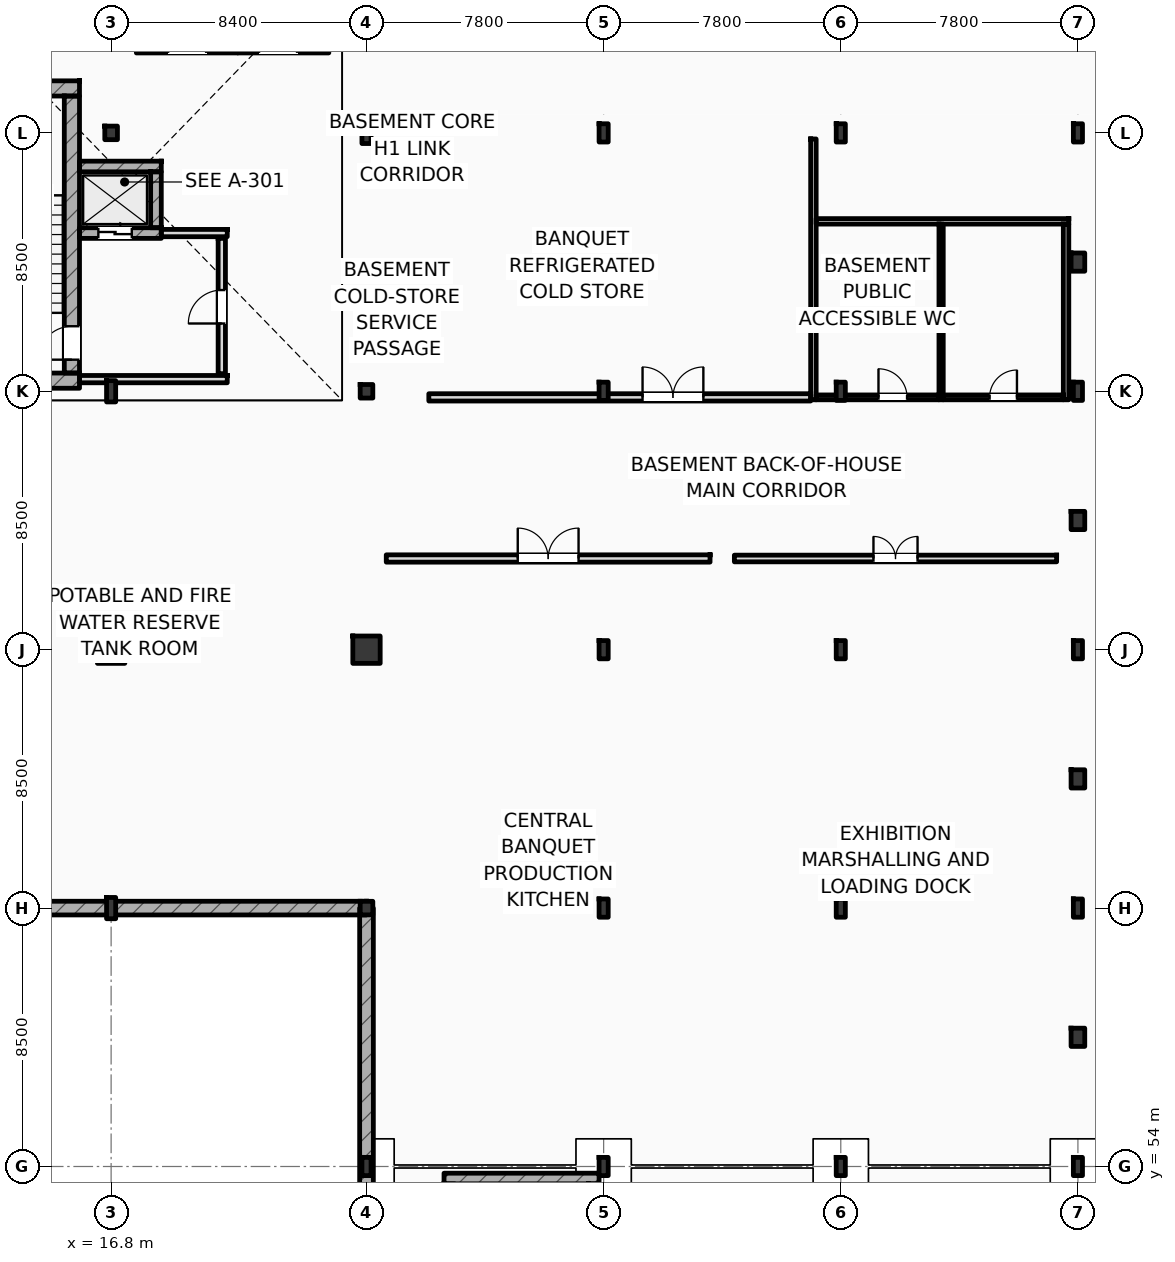
"""IFC4 building model, lengths in metres.
Left out: names, types, materials, properties, quantities, classifications, styles, units other than length and angle.
Written with IfcOpenShell. Run it as: python <this file> out.ifc"""

import sys

from ifc_helpers import new_model, si_unit, direction, frame, frame_2d, origin, origin_2d, place, context, subcontext, project, spatial, rectangle, i_section, extrude, element, fill, save


model = new_model("IFC4")
c1 = context("Model", 3, precision=1e-05, world=origin(), true_north=direction((0.0, 1.0)))
c2 = subcontext(c1, "Body", "Model", "MODEL_VIEW")
j1 = project(units=[si_unit("LENGTHUNIT", "METRE"), si_unit("PLANEANGLEUNIT", "RADIAN")], contexts=[c1])
p1 = place(None, origin())
s1 = spatial("IfcSite", under=j1, at=p1, CompositionType="ELEMENT")
p2 = place(p1, origin())
s2 = spatial("IfcBuilding", under=s1, at=p2, CompositionType="ELEMENT")
p3 = place(p2, frame((0.0, 0.0, -4.5)))
s3 = spatial("IfcBuildingStorey", under=s2, at=p3, CompositionType="ELEMENT", Elevation=-4.5)
p4 = place(p3, frame((0.0, 62.5, 0.0), z_axis=(0.0, 0.0, 1.0), x_axis=(1.0, 0.0, 0.0)))
e1 = element("IfcWall", 1, at=p4, inside=s3, PredefinedType="SOLIDWALL", context=c2, shape_type="SweptSolid", body=[
    extrude(rectangle(XDim=25.2, YDim=0.45, at=frame_2d((12.6, 0.0))), origin(), (0.0, 0.0, 1.0), 4.5),
])
p5 = place(p3, frame((25.2, 62.5, 0.0), z_axis=(0.0, 0.0, 1.0), x_axis=(0.0, -1.0, 0.0)))
e2 = element("IfcWall", 2, at=p5, inside=s3, PredefinedType="SOLIDWALL", context=c2, shape_type="SweptSolid", body=[
    extrude(rectangle(XDim=57.0, YDim=0.45, at=frame_2d((28.5, 0.0))), origin(), (0.0, 0.0, 1.0), 4.5),
])
p6 = place(p3, frame((16.8, 62.5, 0.0), z_axis=(0.0, 0.0, 1.0), x_axis=(1.0, 0.0, 0.0)))
e3 = element("IfcColumn", 3, at=p6, inside=s3, PredefinedType="COLUMN", context=c2, shape_type="SweptSolid", body=[
    extrude(i_section(OverallWidth=0.3, OverallDepth=0.7, WebThickness=0.017, FlangeThickness=0.032, FilletRadius=0.027, at=origin_2d()), origin(), (0.0, 0.0, 1.0), 4.5),
])
p7 = place(p3, frame((16.8, 71.0, 0.0), z_axis=(0.0, 0.0, 1.0), x_axis=(1.0, 0.0, 0.0)))
e4 = element("IfcColumn", 4, at=p7, inside=s3, PredefinedType="COLUMN", context=c2, shape_type="SweptSolid", body=[
    extrude(rectangle(XDim=0.9, YDim=0.9, at=origin_2d()), origin(), (0.0, 0.0, 1.0), 4.5),
])
p8 = place(p3, frame((16.8, 79.5, 0.0), z_axis=(0.0, 0.0, 1.0), x_axis=(1.0, 0.0, 0.0)))
e5 = element("IfcColumn", 5, at=p8, inside=s3, PredefinedType="COLUMN", context=c2, shape_type="SweptSolid", body=[
    extrude(i_section(OverallWidth=0.3, OverallDepth=0.7, WebThickness=0.017, FlangeThickness=0.032, FilletRadius=0.027, at=origin_2d()), origin(), (0.0, 0.0, 1.0), 4.5),
])
for number, where, z_axis, x_axis in (
    (6, (16.8, 88.0, 0.0), (0.0, 0.0, 1.0), (1.0, 0.0, 0.0)),
    (7, (25.2, 62.5, 0.0), (0.0, 0.0, 1.0), (1.0, 0.0, 0.0)),
):
    element("IfcColumn", number, at=place(p3, frame(where, z_axis=z_axis, x_axis=x_axis)), inside=s3, PredefinedType="COLUMN", context=c2, shape_type="SweptSolid", body=[
        extrude(i_section(OverallWidth=0.416, OverallDepth=0.446, WebThickness=0.036, FlangeThickness=0.048, FilletRadius=0.015, at=origin_2d()), origin(), (0.0, 0.0, 1.0), 4.5),
    ])
p9 = place(p3, frame((25.2, 71.0, 0.0), z_axis=(0.0, 0.0, 1.0), x_axis=(1.0, 0.0, 0.0)))
e8 = element("IfcColumn", 8, at=p9, inside=s3, PredefinedType="COLUMN", context=c2, shape_type="SweptSolid", body=[
    extrude(rectangle(XDim=0.9, YDim=0.9, at=origin_2d()), origin(), (0.0, 0.0, 1.0), 4.5),
])
p10 = place(p3, frame((25.2, 79.5, 0.0), z_axis=(0.0, 0.0, 1.0), x_axis=(1.0, 0.0, 0.0)))
e9 = element("IfcColumn", 9, at=p10, inside=s3, PredefinedType="COLUMN", context=c2, shape_type="SweptSolid", body=[
    extrude(i_section(OverallWidth=0.416, OverallDepth=0.446, WebThickness=0.036, FlangeThickness=0.048, FilletRadius=0.015, at=origin_2d()), origin(), (0.0, 0.0, 1.0), 4.5),
])
p11 = place(p3, frame((25.2, 88.0, 0.0), z_axis=(0.0, 0.0, 1.0), x_axis=(1.0, 0.0, 0.0)))
e10 = element("IfcColumn", 10, at=p11, inside=s3, PredefinedType="COLUMN", context=c2, shape_type="SweptSolid", body=[
    extrude(i_section(OverallWidth=0.3, OverallDepth=0.7, WebThickness=0.017, FlangeThickness=0.032, FilletRadius=0.027, at=origin_2d()), origin(), (0.0, 0.0, 1.0), 4.5),
])
for number, where, z_axis, x_axis in (
    (11, (25.2, 54.0, 0.0), (0.0, 0.0, 1.0), (1.0, 0.0, 0.0)),
    (12, (33.0, 54.0, 0.0), (0.0, 0.0, 1.0), (1.0, 0.0, 0.0)),
    (13, (33.0, 62.5, 0.0), (0.0, 0.0, 1.0), (1.0, 0.0, 0.0)),
    (14, (33.0, 71.0, 0.0), (0.0, 0.0, 1.0), (1.0, 0.0, 0.0)),
    (15, (33.0, 79.5, 0.0), (0.0, 0.0, 1.0), (1.0, 0.0, 0.0)),
    (16, (33.0, 88.0, 0.0), (0.0, 0.0, 1.0), (1.0, 0.0, 0.0)),
    (17, (40.8, 54.0, 0.0), (0.0, 0.0, 1.0), (1.0, 0.0, 0.0)),
    (18, (40.8, 62.5, 0.0), (0.0, 0.0, 1.0), (1.0, 0.0, 0.0)),
    (19, (40.8, 71.0, 0.0), (0.0, 0.0, 1.0), (1.0, 0.0, 0.0)),
    (20, (40.8, 79.5, 0.0), (0.0, 0.0, 1.0), (1.0, 0.0, 0.0)),
    (21, (40.8, 88.0, 0.0), (0.0, 0.0, 1.0), (1.0, 0.0, 0.0)),
    (22, (48.6, 54.0, 0.0), (0.0, 0.0, 1.0), (1.0, 0.0, 0.0)),
    (23, (48.6, 62.5, 0.0), (0.0, 0.0, 1.0), (1.0, 0.0, 0.0)),
    (24, (48.6, 71.0, 0.0), (0.0, 0.0, 1.0), (1.0, 0.0, 0.0)),
    (25, (48.6, 79.5, 0.0), (0.0, 0.0, 1.0), (1.0, 0.0, 0.0)),
    (26, (48.6, 88.0, 0.0), (0.0, 0.0, 1.0), (1.0, 0.0, 0.0)),
):
    element("IfcColumn", number, at=place(p3, frame(where, z_axis=z_axis, x_axis=x_axis)), inside=s3, PredefinedType="COLUMN", context=c2, shape_type="SweptSolid", body=[
        extrude(i_section(OverallWidth=0.3, OverallDepth=0.6, WebThickness=0.015, FlangeThickness=0.03, FilletRadius=0.027, at=origin_2d()), origin(), (0.0, 0.0, 1.0), 4.5),
    ])
for number, where, z_axis, x_axis in (
    (27, (48.6, 58.25, 0.0), (0.0, 0.0, 1.0), (1.0, 0.0, 0.0)),
    (28, (48.6, 66.75, 0.0), (0.0, 0.0, 1.0), (1.0, 0.0, 0.0)),
    (29, (48.6, 75.25, 0.0), (0.0, 0.0, 1.0), (1.0, 0.0, 0.0)),
    (30, (48.6, 83.75, 0.0), (0.0, 0.0, 1.0), (1.0, 0.0, 0.0)),
):
    element("IfcColumn", number, at=place(p3, frame(where, z_axis=z_axis, x_axis=x_axis)), inside=s3, PredefinedType="PILASTER", context=c2, shape_type="SweptSolid", body=[
        extrude(rectangle(XDim=0.45, YDim=0.6, at=origin_2d()), origin(), (0.0, 0.0, 1.0), 4.5),
    ])
for number, where, z_axis, x_axis in (
    (31, (10.6, 89.462, 0.0), (0.0, 0.0, 1.0), (1.0, 0.0, 0.0)),
    (32, (10.6, 79.85, 0.0), (0.0, 0.0, 1.0), (1.0, 0.0, 0.0)),
):
    element("IfcWall", number, at=place(p3, frame(where, z_axis=z_axis, x_axis=x_axis)), inside=s3, PredefinedType="SHEAR", context=c2, shape_type="SweptSolid", body=[
        extrude(rectangle(XDim=5.16, YDim=0.5, at=frame_2d((2.58, 0.0))), origin(), (0.0, 0.0, 1.0), 4.5),
    ])
p12 = place(p3, frame((15.51, 80.1, 0.0), z_axis=(0.0, 0.0, 1.0), x_axis=(0.0, 1.0, 0.0)))
e33 = element("IfcWall", 33, at=p12, inside=s3, PredefinedType="SHEAR", context=c2, shape_type="SweptSolid", body=[
    extrude(rectangle(XDim=9.112, YDim=0.5, at=frame_2d((4.556, 0.0))), origin(), (0.0, 0.0, 1.0), 4.5),
])
p13 = place(p12, frame((0.44, 0.0, 0.0)))
e34 = element("IfcOpeningElement", 34, at=p13, cuts=e33, PredefinedType="OPENING", context=c2, shape_type="SweptSolid", body=[
    extrude(rectangle(XDim=1.1, YDim=2.2, at=frame_2d((0.55, 1.1))), frame((0.0, 0.26, 0.0), z_axis=(0.0, -1.0, 0.0), x_axis=(1.0, 0.0, 0.0)), (0.0, 0.0, 1.0), 0.52),
])
p14 = place(p3, frame((27.75, 53.605, 0.0), z_axis=(0.0, 0.0, 1.0), x_axis=(1.0, 0.0, 0.0)))
e35 = element("IfcWall", 35, at=p14, inside=s3, PredefinedType="SHEAR", context=c2, shape_type="SweptSolid", body=[
    extrude(rectangle(XDim=5.1, YDim=0.35, at=frame_2d((2.55, 0.0))), origin(), (0.0, 0.0, 1.0), 4.5),
])
p15 = place(p3, frame((15.76, 86.895, 0.0), z_axis=(0.0, 0.0, 1.0), x_axis=(1.0, 0.0, 0.0)))
e36 = element("IfcWall", 36, at=p15, inside=s3, PredefinedType="SHEAR", context=c2, shape_type="SweptSolid", body=[
    extrude(rectangle(XDim=2.69, YDim=0.35, at=frame_2d((1.345, 0.0))), origin(), (0.0, 0.0, 1.0), 4.1),
])
p16 = place(p3, frame((15.76, 84.705, 0.0), z_axis=(0.0, 0.0, 1.0), x_axis=(1.0, 0.0, 0.0)))
e37 = element("IfcWall", 37, at=p16, inside=s3, PredefinedType="SHEAR", context=c2, shape_type="SweptSolid", body=[
    extrude(rectangle(XDim=2.69, YDim=0.35, at=frame_2d((1.345, 0.0))), origin(), (0.0, 0.0, 1.0), 4.1),
])
p17 = place(p16, frame((0.62, 0.0, 0.0)))
e38 = element("IfcOpeningElement", 38, at=p17, cuts=e37, PredefinedType="OPENING", context=c2, shape_type="SweptSolid", body=[
    extrude(rectangle(XDim=1.1, YDim=2.2, at=frame_2d((0.55, 1.1))), frame((0.0, 0.185, 0.0), z_axis=(0.0, -1.0, 0.0), x_axis=(1.0, 0.0, 0.0)), (0.0, 0.0, 1.0), 0.37),
])
p18 = place(p3, frame((18.275, 84.88, 0.0), z_axis=(0.0, 0.0, 1.0), x_axis=(0.0, 1.0, 0.0)))
e39 = element("IfcWall", 39, at=p18, inside=s3, PredefinedType="SHEAR", context=c2, shape_type="SweptSolid", body=[
    extrude(rectangle(XDim=1.84, YDim=0.35, at=frame_2d((0.92, 0.0))), origin(), (0.0, 0.0, 1.0), 4.1),
])
p19 = place(p3, frame((17.63, 90.805, 0.0), z_axis=(0.0, 0.0, 1.0), x_axis=(1.0, 0.0, 0.0)))
e40 = element("IfcWall", 40, at=p19, inside=s3, PredefinedType="SHEAR", context=c2, shape_type="SweptSolid", body=[
    extrude(rectangle(XDim=3.34, YDim=0.35, at=frame_2d((1.67, 0.0))), origin(), (0.0, 0.0, 1.0), 4.1),
])
p20 = place(p19, frame((1.045, 0.0, 0.0)))
e41 = element("IfcOpeningElement", 41, at=p20, cuts=e40, PredefinedType="OPENING", context=c2, shape_type="SweptSolid", body=[
    extrude(rectangle(XDim=1.25, YDim=2.25, at=frame_2d((0.625, 1.125))), frame((0.0, 0.185, 0.0), z_axis=(0.0, -1.0, 0.0), x_axis=(1.0, 0.0, 0.0)), (0.0, 0.0, 1.0), 0.37),
])
p21 = place(p3, frame((20.97, 90.805, 0.0), z_axis=(0.0, 0.0, 1.0), x_axis=(1.0, 0.0, 0.0)))
e42 = element("IfcWall", 42, at=p21, inside=s3, PredefinedType="SHEAR", context=c2, shape_type="SweptSolid", body=[
    extrude(rectangle(XDim=2.99, YDim=0.35, at=frame_2d((1.495, 0.0))), origin(), (0.0, 0.0, 1.0), 4.1),
])
p22 = place(p21, frame((0.695, 0.0, 0.0)))
e43 = element("IfcOpeningElement", 43, at=p22, cuts=e42, PredefinedType="OPENING", context=c2, shape_type="SweptSolid", body=[
    extrude(rectangle(XDim=1.25, YDim=2.25, at=frame_2d((0.625, 1.125))), frame((0.0, 0.185, 0.0), z_axis=(0.0, -1.0, 0.0), x_axis=(1.0, 0.0, 0.0)), (0.0, 0.0, 1.0), 0.37),
])
p23 = place(p3, frame((15.76, 79.9, 0.0), z_axis=(0.0, 0.0, 1.0), x_axis=(1.0, 0.0, 0.0)))
e44 = element("IfcWall", 44, at=p23, inside=s3, PredefinedType="STANDARD", context=c2, shape_type="SweptSolid", body=[
    extrude(rectangle(XDim=4.86, YDim=0.24, at=frame_2d((2.43, 0.0))), origin(), (0.0, 0.0, 1.0), 4.1),
])
p24 = place(p3, frame((18.45, 84.705, 0.0), z_axis=(0.0, 0.0, 1.0), x_axis=(1.0, 0.0, 0.0)))
e45 = element("IfcWall", 45, at=p24, inside=s3, PredefinedType="STANDARD", context=c2, shape_type="SweptSolid", body=[
    extrude(rectangle(XDim=2.17, YDim=0.24, at=frame_2d((1.085, 0.0))), origin(), (0.0, 0.0, 1.0), 4.1),
])
p25 = place(p3, frame((20.44, 80.08, 0.0), z_axis=(0.0, 0.0, 1.0), x_axis=(0.0, 1.0, 0.0)))
e46 = element("IfcWall", 46, at=p25, inside=s3, PredefinedType="STANDARD", context=c2, shape_type="SweptSolid", body=[
    extrude(rectangle(XDim=4.45, YDim=0.24, at=frame_2d((2.225, 0.0))), origin(), (0.0, 0.0, 1.0), 4.1),
])
p26 = place(p25, frame((1.65, 0.0, 0.0)))
e47 = element("IfcOpeningElement", 47, at=p26, cuts=e46, PredefinedType="OPENING", context=c2, shape_type="SweptSolid", body=[
    extrude(rectangle(XDim=1.1, YDim=2.2, at=frame_2d((0.55, 1.1))), frame((0.0, 0.13, 0.0), z_axis=(0.0, -1.0, 0.0), x_axis=(1.0, 0.0, 0.0)), (0.0, 0.0, 1.0), 0.26),
])
p27 = place(p3, frame((25.85, 74.0, 0.0), z_axis=(0.0, 0.0, 1.0), x_axis=(1.0, 0.0, 0.0)))
e48 = element("IfcWall", 48, at=p27, inside=s3, PredefinedType="STANDARD", context=c2, shape_type="SweptSolid", body=[
    extrude(rectangle(XDim=10.65, YDim=0.24, at=frame_2d((5.325, 0.0))), origin(), (0.0, 0.0, 1.0), 4.1),
])
p28 = place(p27, frame((4.325, 0.0, 0.0)))
e49 = element("IfcOpeningElement", 49, at=p28, cuts=e48, PredefinedType="OPENING", context=c2, shape_type="SweptSolid", body=[
    extrude(rectangle(XDim=2.0, YDim=2.35, at=frame_2d((1.0, 1.175))), frame((0.0, 0.13, 0.0), z_axis=(0.0, -1.0, 0.0), x_axis=(1.0, 0.0, 0.0)), (0.0, 0.0, 1.0), 0.26),
])
p29 = place(p3, frame((37.3, 74.0, 0.0), z_axis=(0.0, 0.0, 1.0), x_axis=(1.0, 0.0, 0.0)))
e50 = element("IfcWall", 50, at=p29, inside=s3, PredefinedType="PARTITIONING", context=c2, shape_type="SweptSolid", body=[
    extrude(rectangle(XDim=10.6, YDim=0.22, at=frame_2d((5.3, 0.0))), origin(), (0.0, 0.0, 1.0), 4.1),
])
p30 = place(p29, frame((4.575, 0.0, 0.0)))
e51 = element("IfcOpeningElement", 51, at=p30, cuts=e50, PredefinedType="OPENING", context=c2, shape_type="SweptSolid", body=[
    extrude(rectangle(XDim=1.45, YDim=2.2, at=frame_2d((0.725, 1.1))), frame((0.0, 0.12, 0.0), z_axis=(0.0, -1.0, 0.0), x_axis=(1.0, 0.0, 0.0)), (0.0, 0.0, 1.0), 0.24),
])
p31 = place(p3, frame((27.25, 79.3, 0.0), z_axis=(0.0, 0.0, 1.0), x_axis=(1.0, 0.0, 0.0)))
e52 = element("IfcWall", 52, at=p31, inside=s3, PredefinedType="STANDARD", context=c2, shape_type="SweptSolid", body=[
    extrude(rectangle(XDim=12.56, YDim=0.24, at=frame_2d((6.28, 0.0))), origin(), (0.0, 0.0, 1.0), 3.59),
])
p32 = place(p31, frame((7.03, 0.0, 0.0)))
e53 = element("IfcOpeningElement", 53, at=p32, cuts=e52, PredefinedType="OPENING", context=c2, shape_type="SweptSolid", body=[
    extrude(rectangle(XDim=2.0, YDim=2.35, at=frame_2d((1.0, 1.175))), frame((0.0, 0.13, 0.0), z_axis=(0.0, -1.0, 0.0), x_axis=(1.0, 0.0, 0.0)), (0.0, 0.0, 1.0), 0.26),
])
p33 = place(p3, frame((39.99, 79.3, 0.0), z_axis=(0.0, 0.0, 1.0), x_axis=(1.0, 0.0, 0.0)))
e54 = element("IfcWall", 54, at=p33, inside=s3, PredefinedType="PARTITIONING", context=c2, shape_type="SweptSolid", body=[
    extrude(rectangle(XDim=4.04, YDim=0.16, at=frame_2d((2.02, 0.0))), origin(), (0.0, 0.0, 1.0), 3.59),
])
p34 = place(p33, frame((2.05, 0.0, 0.0)))
e55 = element("IfcOpeningElement", 55, at=p34, cuts=e54, PredefinedType="OPENING", context=c2, shape_type="SweptSolid", body=[
    extrude(rectangle(XDim=0.94, YDim=2.15, at=frame_2d((0.47, 1.075))), frame((0.0, 0.09, 0.0), z_axis=(0.0, -1.0, 0.0), x_axis=(1.0, 0.0, 0.0)), (0.0, 0.0, 1.0), 0.18),
])
p35 = place(p3, frame((44.17, 79.3, 0.0), z_axis=(0.0, 0.0, 1.0), x_axis=(1.0, 0.0, 0.0)))
e56 = element("IfcWall", 56, at=p35, inside=s3, PredefinedType="PARTITIONING", context=c2, shape_type="SweptSolid", body=[
    extrude(rectangle(XDim=3.95, YDim=0.16, at=frame_2d((1.975, 0.0))), origin(), (0.0, 0.0, 1.0), 3.59),
])
p36 = place(p35, frame((1.525, 0.0, 0.0)))
e57 = element("IfcOpeningElement", 57, at=p36, cuts=e56, PredefinedType="OPENING", context=c2, shape_type="SweptSolid", body=[
    extrude(rectangle(XDim=0.9, YDim=2.1, at=frame_2d((0.45, 1.05))), frame((0.0, 0.09, 0.0), z_axis=(0.0, -1.0, 0.0), x_axis=(1.0, 0.0, 0.0)), (0.0, 0.0, 1.0), 0.18),
])
p37 = place(p3, frame((39.9, 79.22, 0.0), z_axis=(0.0, 0.0, 1.0), x_axis=(0.0, 1.0, 0.0)))
e58 = element("IfcWall", 58, at=p37, inside=s3, PredefinedType="PARTITIONING", context=c2, shape_type="SweptSolid", body=[
    extrude(rectangle(XDim=8.58, YDim=0.18, at=frame_2d((4.29, 0.0))), origin(), (0.0, 0.0, 1.0), 4.1),
])
p38 = place(p3, frame((44.1, 79.22, 0.0), z_axis=(0.0, 0.0, 1.0), x_axis=(0.0, 1.0, 0.0)))
e59 = element("IfcWall", 59, at=p38, inside=s3, PredefinedType="PARTITIONING", context=c2, shape_type="SweptSolid", body=[
    extrude(rectangle(XDim=5.78, YDim=0.14, at=frame_2d((2.89, 0.0))), origin(), (0.0, 0.0, 1.0), 4.1),
])
p39 = place(p3, frame((48.21, 79.22, 0.0), z_axis=(0.0, 0.0, 1.0), x_axis=(0.0, 1.0, 0.0)))
e60 = element("IfcWall", 60, at=p39, inside=s3, PredefinedType="PARTITIONING", context=c2, shape_type="SweptSolid", body=[
    extrude(rectangle(XDim=5.78, YDim=0.18, at=frame_2d((2.89, 0.0))), origin(), (0.0, 0.0, 1.0), 4.1),
])
p40 = place(p3, frame((39.99, 85.09, 0.0), z_axis=(0.0, 0.0, 1.0), x_axis=(1.0, 0.0, 0.0)))
e61 = element("IfcWall", 61, at=p40, inside=s3, PredefinedType="PARTITIONING", context=c2, shape_type="SweptSolid", body=[
    extrude(rectangle(XDim=8.31, YDim=0.18, at=frame_2d((4.155, 0.0))), origin(), (0.0, 0.0, 1.0), 4.1),
])
p41 = place(p13, origin())
e62 = element("IfcDoor", 62, at=p41, inside=s3, OperationType="SINGLE_SWING_LEFT", PredefinedType="DOOR", context=c2, shape_type="SweptSolid", body=[
    extrude(rectangle(XDim=1.1, YDim=2.2, at=frame_2d((0.55, 1.1))), frame((0.0, 0.025, 0.0), z_axis=(0.0, -1.0, 0.0), x_axis=(1.0, 0.0, 0.0)), (0.0, 0.0, 1.0), 0.05),
])
fill(e34, e62)
p42 = place(p17, origin())
e63 = element("IfcDoor", 63, at=p42, inside=s3, OperationType="SLIDING_TO_LEFT", PredefinedType="DOOR", context=c2, shape_type="SweptSolid", body=[
    extrude(rectangle(XDim=1.1, YDim=2.2, at=frame_2d((0.55, 1.1))), frame((0.0, 0.025, 0.0), z_axis=(0.0, -1.0, 0.0), x_axis=(1.0, 0.0, 0.0)), (0.0, 0.0, 1.0), 0.05),
])
fill(e38, e63)
p43 = place(p26, origin())
e64 = element("IfcDoor", 64, at=p43, inside=s3, OperationType="SINGLE_SWING_LEFT", PredefinedType="DOOR", context=c2, shape_type="SweptSolid", body=[
    extrude(rectangle(XDim=1.1, YDim=2.2, at=frame_2d((0.55, 1.1))), frame((0.0, 0.025, 0.0), z_axis=(0.0, -1.0, 0.0), x_axis=(1.0, 0.0, 0.0)), (0.0, 0.0, 1.0), 0.05),
])
fill(e47, e64)
p44 = place(p28, origin())
e65 = element("IfcDoor", 65, at=p44, inside=s3, OperationType="DOUBLE_SWING_LEFT", PredefinedType="DOOR", context=c2, shape_type="SweptSolid", body=[
    extrude(rectangle(XDim=2.0, YDim=2.35, at=frame_2d((1.0, 1.175))), frame((0.0, 0.025, 0.0), z_axis=(0.0, -1.0, 0.0), x_axis=(1.0, 0.0, 0.0)), (0.0, 0.0, 1.0), 0.05),
])
fill(e49, e65)
p45 = place(p30, origin())
e66 = element("IfcDoor", 66, at=p45, inside=s3, OperationType="DOUBLE_SWING_LEFT", PredefinedType="DOOR", context=c2, shape_type="SweptSolid", body=[
    extrude(rectangle(XDim=1.45, YDim=2.2, at=frame_2d((0.725, 1.1))), frame((0.0, 0.025, 0.0), z_axis=(0.0, -1.0, 0.0), x_axis=(1.0, 0.0, 0.0)), (0.0, 0.0, 1.0), 0.05),
])
fill(e51, e66)
p46 = place(p32, origin())
e67 = element("IfcDoor", 67, at=p46, inside=s3, OperationType="DOUBLE_SWING_LEFT", PredefinedType="DOOR", context=c2, shape_type="SweptSolid", body=[
    extrude(rectangle(XDim=2.0, YDim=2.35, at=frame_2d((1.0, 1.175))), frame((0.0, 0.025, 0.0), z_axis=(0.0, -1.0, 0.0), x_axis=(1.0, 0.0, 0.0)), (0.0, 0.0, 1.0), 0.05),
])
fill(e53, e67)
p47 = place(p34, origin())
e68 = element("IfcDoor", 68, at=p47, inside=s3, OperationType="SINGLE_SWING_LEFT", PredefinedType="DOOR", context=c2, shape_type="SweptSolid", body=[
    extrude(rectangle(XDim=0.94, YDim=2.15, at=frame_2d((0.47, 1.075))), frame((0.0, 0.025, 0.0), z_axis=(0.0, -1.0, 0.0), x_axis=(1.0, 0.0, 0.0)), (0.0, 0.0, 1.0), 0.05),
])
fill(e55, e68)
p48 = place(p36, origin())
e69 = element("IfcDoor", 69, at=p48, inside=s3, OperationType="SINGLE_SWING_RIGHT", PredefinedType="DOOR", context=c2, shape_type="SweptSolid", body=[
    extrude(rectangle(XDim=0.9, YDim=2.1, at=frame_2d((0.45, 1.05))), frame((0.0, 0.025, 0.0), z_axis=(0.0, -1.0, 0.0), x_axis=(1.0, 0.0, 0.0)), (0.0, 0.0, 1.0), 0.05),
])
fill(e57, e69)
save(model, sys.argv[1])
